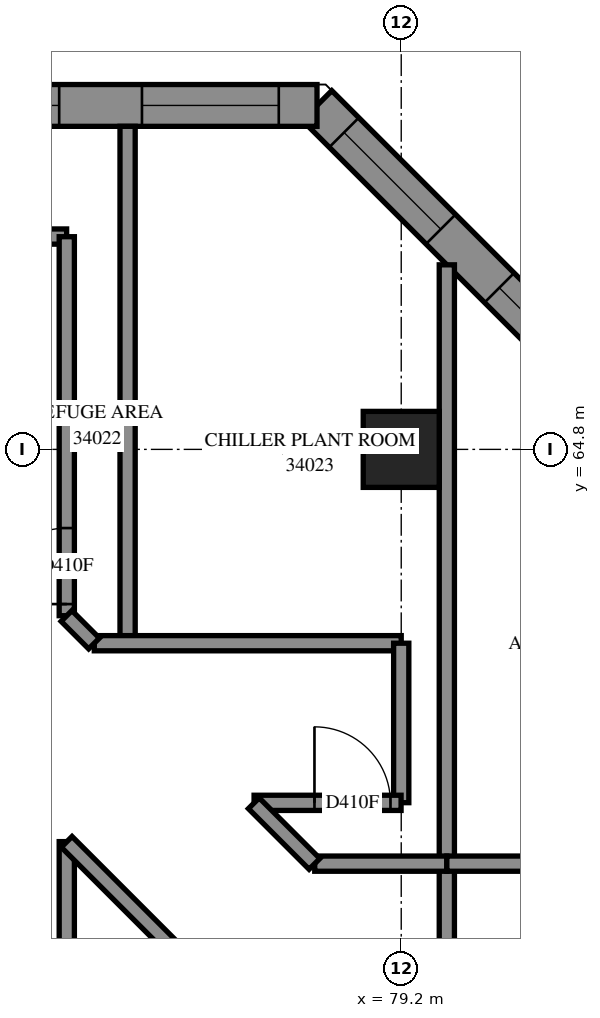
"""IFC4 building model, lengths in metres.
Left out: names, types, materials, properties, quantities, classifications, styles, units other than length and angle.
Written with IfcOpenShell. Run it as: python <this file> out.ifc"""

import sys

from ifc_helpers import new_model, si_unit, direction, frame, frame_2d, origin, origin_2d, place, context, subcontext, project, spatial, polyline, rectangle, outline, extrude, element, fill, save


model = new_model("IFC4")
c1 = context("Model", 3, precision=1e-05, world=origin(), true_north=direction((0.0, 1.0)))
c2 = subcontext(c1, "Body", "Model", "MODEL_VIEW")
j1 = project(units=[si_unit("LENGTHUNIT", "METRE"), si_unit("PLANEANGLEUNIT", "RADIAN")], contexts=[c1])
p1 = place(None, origin())
s1 = spatial("IfcSite", under=j1, at=p1, CompositionType="ELEMENT")
p2 = place(p1, origin())
s2 = spatial("IfcBuilding", under=s1, at=p2, CompositionType="ELEMENT")
p3 = place(p2, frame((0.0, 0.0, 126.2)))
s3 = spatial("IfcBuildingStorey", under=s2, at=p3, CompositionType="ELEMENT", Elevation=126.2)
p4 = place(p3, frame((79.2, 64.8, 0.0), z_axis=(0.0, 0.0, 1.0), x_axis=(1.0, 0.0, 0.0)))
e1 = element("IfcColumn", 1, at=p4, inside=s3, PredefinedType="COLUMN", context=c2, shape_type="SweptSolid", body=[
    extrude(rectangle(XDim=1.0, YDim=1.0, at=origin_2d()), origin(), (0.0, 0.0, 1.0), 4.7),
])
p5 = place(p3, frame((76.407, 49.337, -0.3), z_axis=(0.0, 0.0, 1.0), x_axis=(0.7071067812, 0.7071067812, 0.0)))
e2 = element("IfcWall", 2, at=p5, inside=s3, PredefinedType="SHEAR", context=c2, shape_type="SweptSolid", body=[
    extrude(rectangle(XDim=14.4, YDim=0.7, at=frame_2d((7.2, 0.0))), origin(), (0.0, 0.0, 1.0), 4.3),
])
p6 = place(p5, frame((4.55, 0.0, 0.3)))
e3 = element("IfcOpeningElement", 3, at=p6, cuts=e2, PredefinedType="OPENING", context=c2, shape_type="SweptSolid", body=[
    extrude(rectangle(XDim=1.1, YDim=2.1, at=frame_2d((0.55, 1.05))), frame((0.0, 0.36, 0.0), z_axis=(0.0, -1.0, 0.0), x_axis=(1.0, 0.0, 0.0)), (0.0, 0.0, 1.0), 0.72),
])
p7 = place(p5, frame((11.35, 0.0, 0.3)))
e4 = element("IfcOpeningElement", 4, at=p7, cuts=e2, PredefinedType="OPENING", context=c2, shape_type="SweptSolid", body=[
    extrude(rectangle(XDim=1.1, YDim=2.1, at=frame_2d((0.55, 1.05))), frame((0.0, 0.36, 0.0), z_axis=(0.0, -1.0, 0.0), x_axis=(1.0, 0.0, 0.0)), (0.0, 0.0, 1.0), 0.72),
])
p8 = place(p3, frame((104.267, 43.15, 0.0), z_axis=(0.0, 0.0, 1.0), x_axis=(-0.7071054305, 0.7071081319, 0.0)))
e5 = element("IfcWall", 5, at=p8, inside=s3, PredefinedType="SOLIDWALL", context=c2, shape_type="SweptSolid", body=[
    extrude(outline(polyline([(-0.275, -0.275), (37.131, -0.275), (36.903, 0.275), (0.275, 0.275), (-0.275, -0.275)])), origin(), (0.0, 0.0, 1.0), 4.7),
])
p9 = place(p8, frame((3.325, 0.0, 0.9)))
e6 = element("IfcOpeningElement", 6, at=p9, cuts=e5, PredefinedType="OPENING", context=c2, shape_type="SweptSolid", body=[
    extrude(rectangle(XDim=1.8, YDim=2.4, at=frame_2d((0.9, 1.2))), frame((0.0, 0.285, 0.0), z_axis=(0.0, -1.0, 0.0), x_axis=(1.0, 0.0, 0.0)), (0.0, 0.0, 1.0), 0.57),
])
p10 = place(p8, frame((6.675, 0.0, 0.9)))
e7 = element("IfcOpeningElement", 7, at=p10, cuts=e5, PredefinedType="OPENING", context=c2, shape_type="SweptSolid", body=[
    extrude(rectangle(XDim=1.8, YDim=2.4, at=frame_2d((0.9, 1.2))), frame((0.0, 0.285, 0.0), z_axis=(0.0, -1.0, 0.0), x_axis=(1.0, 0.0, 0.0)), (0.0, 0.0, 1.0), 0.57),
])
p11 = place(p8, frame((24.625, 0.0, 0.9)))
e8 = element("IfcOpeningElement", 8, at=p11, cuts=e5, PredefinedType="OPENING", context=c2, shape_type="SweptSolid", body=[
    extrude(rectangle(XDim=1.8, YDim=2.4, at=frame_2d((0.9, 1.2))), frame((0.0, 0.285, 0.0), z_axis=(0.0, -1.0, 0.0), x_axis=(1.0, 0.0, 0.0)), (0.0, 0.0, 1.0), 0.57),
])
p12 = place(p8, frame((28.225, 0.0, 0.9)))
e9 = element("IfcOpeningElement", 9, at=p12, cuts=e5, PredefinedType="OPENING", context=c2, shape_type="SweptSolid", body=[
    extrude(rectangle(XDim=1.8, YDim=2.4, at=frame_2d((0.9, 1.2))), frame((0.0, 0.285, 0.0), z_axis=(0.0, -1.0, 0.0), x_axis=(1.0, 0.0, 0.0)), (0.0, 0.0, 1.0), 0.57),
])
p13 = place(p8, frame((31.825, 0.0, 0.9)))
e10 = element("IfcOpeningElement", 10, at=p13, cuts=e5, PredefinedType="OPENING", context=c2, shape_type="SweptSolid", body=[
    extrude(rectangle(XDim=1.8, YDim=2.4, at=frame_2d((0.9, 1.2))), frame((0.0, 0.285, 0.0), z_axis=(0.0, -1.0, 0.0), x_axis=(1.0, 0.0, 0.0)), (0.0, 0.0, 1.0), 0.57),
])
p14 = place(p8, frame((34.714, 0.0, 0.9)))
e11 = element("IfcOpeningElement", 11, at=p14, cuts=e5, PredefinedType="OPENING", context=c2, shape_type="SweptSolid", body=[
    extrude(rectangle(XDim=1.8, YDim=2.4, at=frame_2d((0.9, 1.2))), frame((0.0, 0.285, 0.0), z_axis=(0.0, -1.0, 0.0), x_axis=(1.0, 0.0, 0.0)), (0.0, 0.0, 1.0), 0.57),
])
p15 = place(p3, frame((78.092, 69.325, 0.0), z_axis=(0.0, 0.0, 1.0), x_axis=(-1.0, 0.0, 0.0)))
e12 = element("IfcWall", 12, at=p15, inside=s3, PredefinedType="SOLIDWALL", context=c2, shape_type="SweptSolid", body=[
    extrude(outline(polyline([(-0.114, -0.275), (54.092, -0.275), (53.542, 0.275), (0.114, 0.275), (-0.114, -0.275)])), origin(), (0.0, 0.0, 1.0), 4.7),
])
p16 = place(p15, frame((0.503, 0.0, 0.9)))
e13 = element("IfcOpeningElement", 13, at=p16, cuts=e12, PredefinedType="OPENING", context=c2, shape_type="SweptSolid", body=[
    extrude(rectangle(XDim=1.8, YDim=2.4, at=frame_2d((0.9, 1.2))), frame((0.0, 0.285, 0.0), z_axis=(0.0, -1.0, 0.0), x_axis=(1.0, 0.0, 0.0)), (0.0, 0.0, 1.0), 0.57),
])
p17 = place(p15, frame((3.392, 0.0, 0.9)))
e14 = element("IfcOpeningElement", 14, at=p17, cuts=e12, PredefinedType="OPENING", context=c2, shape_type="SweptSolid", body=[
    extrude(rectangle(XDim=1.8, YDim=2.4, at=frame_2d((0.9, 1.2))), frame((0.0, 0.285, 0.0), z_axis=(0.0, -1.0, 0.0), x_axis=(1.0, 0.0, 0.0)), (0.0, 0.0, 1.0), 0.57),
])
p18 = place(p15, frame((6.992, 0.0, 0.9)))
e15 = element("IfcOpeningElement", 15, at=p18, cuts=e12, PredefinedType="OPENING", context=c2, shape_type="SweptSolid", body=[
    extrude(rectangle(XDim=1.8, YDim=2.4, at=frame_2d((0.9, 1.2))), frame((0.0, 0.285, 0.0), z_axis=(0.0, -1.0, 0.0), x_axis=(1.0, 0.0, 0.0)), (0.0, 0.0, 1.0), 0.57),
])
p19 = place(p15, frame((10.592, 0.0, 0.9)))
e16 = element("IfcOpeningElement", 16, at=p19, cuts=e12, PredefinedType="OPENING", context=c2, shape_type="SweptSolid", body=[
    extrude(rectangle(XDim=1.8, YDim=2.4, at=frame_2d((0.9, 1.2))), frame((0.0, 0.285, 0.0), z_axis=(0.0, -1.0, 0.0), x_axis=(1.0, 0.0, 0.0)), (0.0, 0.0, 1.0), 0.57),
])
p20 = place(p15, frame((14.192, 0.0, 0.9)))
e17 = element("IfcOpeningElement", 17, at=p20, cuts=e12, PredefinedType="OPENING", context=c2, shape_type="SweptSolid", body=[
    extrude(rectangle(XDim=1.8, YDim=2.4, at=frame_2d((0.9, 1.2))), frame((0.0, 0.285, 0.0), z_axis=(0.0, -1.0, 0.0), x_axis=(1.0, 0.0, 0.0)), (0.0, 0.0, 1.0), 0.57),
])
p21 = place(p15, frame((17.792, 0.0, 0.9)))
e18 = element("IfcOpeningElement", 18, at=p21, cuts=e12, PredefinedType="OPENING", context=c2, shape_type="SweptSolid", body=[
    extrude(rectangle(XDim=1.8, YDim=2.4, at=frame_2d((0.9, 1.2))), frame((0.0, 0.285, 0.0), z_axis=(0.0, -1.0, 0.0), x_axis=(1.0, 0.0, 0.0)), (0.0, 0.0, 1.0), 0.57),
])
p22 = place(p15, frame((21.392, 0.0, 0.9)))
e19 = element("IfcOpeningElement", 19, at=p22, cuts=e12, PredefinedType="OPENING", context=c2, shape_type="SweptSolid", body=[
    extrude(rectangle(XDim=1.8, YDim=2.4, at=frame_2d((0.9, 1.2))), frame((0.0, 0.285, 0.0), z_axis=(0.0, -1.0, 0.0), x_axis=(1.0, 0.0, 0.0)), (0.0, 0.0, 1.0), 0.57),
])
p23 = place(p15, frame((24.992, 0.0, 0.9)))
e20 = element("IfcOpeningElement", 20, at=p23, cuts=e12, PredefinedType="OPENING", context=c2, shape_type="SweptSolid", body=[
    extrude(rectangle(XDim=1.8, YDim=2.4, at=frame_2d((0.9, 1.2))), frame((0.0, 0.285, 0.0), z_axis=(0.0, -1.0, 0.0), x_axis=(1.0, 0.0, 0.0)), (0.0, 0.0, 1.0), 0.57),
])
p24 = place(p15, frame((28.592, 0.0, 0.9)))
e21 = element("IfcOpeningElement", 21, at=p24, cuts=e12, PredefinedType="OPENING", context=c2, shape_type="SweptSolid", body=[
    extrude(rectangle(XDim=1.8, YDim=2.4, at=frame_2d((0.9, 1.2))), frame((0.0, 0.285, 0.0), z_axis=(0.0, -1.0, 0.0), x_axis=(1.0, 0.0, 0.0)), (0.0, 0.0, 1.0), 0.57),
])
p25 = place(p15, frame((32.192, 0.0, 0.9)))
e22 = element("IfcOpeningElement", 22, at=p25, cuts=e12, PredefinedType="OPENING", context=c2, shape_type="SweptSolid", body=[
    extrude(rectangle(XDim=1.8, YDim=2.4, at=frame_2d((0.9, 1.2))), frame((0.0, 0.285, 0.0), z_axis=(0.0, -1.0, 0.0), x_axis=(1.0, 0.0, 0.0)), (0.0, 0.0, 1.0), 0.57),
])
p26 = place(p15, frame((35.792, 0.0, 0.9)))
e23 = element("IfcOpeningElement", 23, at=p26, cuts=e12, PredefinedType="OPENING", context=c2, shape_type="SweptSolid", body=[
    extrude(rectangle(XDim=1.8, YDim=2.4, at=frame_2d((0.9, 1.2))), frame((0.0, 0.285, 0.0), z_axis=(0.0, -1.0, 0.0), x_axis=(1.0, 0.0, 0.0)), (0.0, 0.0, 1.0), 0.57),
])
p27 = place(p15, frame((39.392, 0.0, 0.9)))
e24 = element("IfcOpeningElement", 24, at=p27, cuts=e12, PredefinedType="OPENING", context=c2, shape_type="SweptSolid", body=[
    extrude(rectangle(XDim=1.8, YDim=2.4, at=frame_2d((0.9, 1.2))), frame((0.0, 0.285, 0.0), z_axis=(0.0, -1.0, 0.0), x_axis=(1.0, 0.0, 0.0)), (0.0, 0.0, 1.0), 0.57),
])
p28 = place(p15, frame((42.992, 0.0, 0.9)))
e25 = element("IfcOpeningElement", 25, at=p28, cuts=e12, PredefinedType="OPENING", context=c2, shape_type="SweptSolid", body=[
    extrude(rectangle(XDim=1.8, YDim=2.4, at=frame_2d((0.9, 1.2))), frame((0.0, 0.285, 0.0), z_axis=(0.0, -1.0, 0.0), x_axis=(1.0, 0.0, 0.0)), (0.0, 0.0, 1.0), 0.57),
])
p29 = place(p15, frame((46.592, 0.0, 0.9)))
e26 = element("IfcOpeningElement", 26, at=p29, cuts=e12, PredefinedType="OPENING", context=c2, shape_type="SweptSolid", body=[
    extrude(rectangle(XDim=1.8, YDim=2.4, at=frame_2d((0.9, 1.2))), frame((0.0, 0.285, 0.0), z_axis=(0.0, -1.0, 0.0), x_axis=(1.0, 0.0, 0.0)), (0.0, 0.0, 1.0), 0.57),
])
p30 = place(p15, frame((50.192, 0.0, 0.9)))
e27 = element("IfcOpeningElement", 27, at=p30, cuts=e12, PredefinedType="OPENING", context=c2, shape_type="SweptSolid", body=[
    extrude(rectangle(XDim=1.8, YDim=2.4, at=frame_2d((0.9, 1.2))), frame((0.0, 0.285, 0.0), z_axis=(0.0, -1.0, 0.0), x_axis=(1.0, 0.0, 0.0)), (0.0, 0.0, 1.0), 0.57),
])
p31 = place(p3, frame((107.838, 44.847, 0.0), z_axis=(0.0, 0.0, 1.0), x_axis=(-0.7071067812, 0.7071067812, 0.0)))
e28 = element("IfcWall", 28, at=p31, inside=s3, PredefinedType="SOLIDWALL", context=c2, shape_type="SweptSolid", body=[
    extrude(outline(polyline([(-0.1, -0.1), (39.926, -0.1), (39.843, 0.1), (0.1, 0.1), (-0.1, -0.1)])), origin(), (0.0, 0.0, 1.0), 4.7),
])
p32 = place(p3, frame((54.8, 67.6, 0.0), z_axis=(0.0, 0.0, 1.0), x_axis=(1.0, 0.0, 0.0)))
e29 = element("IfcWall", 29, at=p32, inside=s3, PredefinedType="PARTITIONING", context=c2, shape_type="SweptSolid", body=[
    extrude(rectangle(XDim=19.998, YDim=0.2, at=frame_2d((9.999, 0.0))), origin(), (0.0, 0.0, 1.0), 4.7),
])
p33 = place(p32, frame((8.738, 0.0, 0.0)))
e30 = element("IfcOpeningElement", 30, at=p33, cuts=e29, PredefinedType="OPENING", context=c2, shape_type="SweptSolid", body=[
    extrude(rectangle(XDim=1.0, YDim=2.1, at=frame_2d((0.5, 1.05))), frame((0.0, 0.11, 0.0), z_axis=(0.0, -1.0, 0.0), x_axis=(1.0, 0.0, 0.0)), (0.0, 0.0, 1.0), 0.22),
])
p34 = place(p3, frame((79.8, 59.35, 0.0), z_axis=(0.0, 0.0, 1.0), x_axis=(0.0, 1.0, 0.0)))
e31 = element("IfcWall", 31, at=p34, inside=s3, PredefinedType="PARTITIONING", context=c2, shape_type="SweptSolid", body=[
    extrude(rectangle(XDim=7.878, YDim=0.2, at=frame_2d((3.939, 0.0))), origin(), (0.0, 0.0, 1.0), 4.7),
])
p35 = place(p3, frame((75.6, 62.25, 0.0), z_axis=(0.0, 0.0, 1.0), x_axis=(0.0, 1.0, 0.0)))
e32 = element("IfcWall", 32, at=p35, inside=s3, PredefinedType="PARTITIONING", context=c2, shape_type="SweptSolid", body=[
    extrude(rectangle(XDim=6.8, YDim=0.2, at=frame_2d((3.4, 0.0))), origin(), (0.0, 0.0, 1.0), 4.7),
])
p36 = place(p3, frame((74.8, 62.612, 0.0), z_axis=(0.0, 0.0, 1.0), x_axis=(0.0, 1.0, 0.0)))
e33 = element("IfcWall", 33, at=p36, inside=s3, PredefinedType="PARTITIONING", context=c2, shape_type="SweptSolid", body=[
    extrude(rectangle(XDim=4.986, YDim=0.2, at=frame_2d((2.493, 0.0))), origin(), (0.0, 0.0, 1.0), 4.7),
])
p37 = place(p36, frame((0.153, 0.0, 0.0)))
e34 = element("IfcOpeningElement", 34, at=p37, cuts=e33, PredefinedType="OPENING", context=c2, shape_type="SweptSolid", body=[
    extrude(rectangle(XDim=1.0, YDim=2.1, at=frame_2d((0.5, 1.05))), frame((0.0, 0.11, 0.0), z_axis=(0.0, -1.0, 0.0), x_axis=(1.0, 0.0, 0.0)), (0.0, 0.0, 1.0), 0.22),
])
p38 = place(p3, frame((74.8, 55.052, 0.0), z_axis=(0.0, 0.0, 1.0), x_axis=(0.0, 1.0, 0.0)))
e35 = element("IfcWall", 35, at=p38, inside=s3, PredefinedType="PARTITIONING", context=c2, shape_type="SweptSolid", body=[
    extrude(rectangle(XDim=4.588, YDim=0.2, at=frame_2d((2.294, 0.0))), origin(), (0.0, 0.0, 1.0), 4.7),
])
p39 = place(p3, frame((75.162, 62.25, 0.0), z_axis=(0.0, 0.0, 1.0), x_axis=(1.0, 0.0, 0.0)))
e36 = element("IfcWall", 36, at=p39, inside=s3, PredefinedType="PARTITIONING", context=c2, shape_type="SweptSolid", body=[
    extrude(rectangle(XDim=4.038, YDim=0.2, at=frame_2d((2.019, 0.0))), origin(), (0.0, 0.0, 1.0), 4.7),
])
p40 = place(p3, frame((74.799, 59.637, 0.0), z_axis=(0.0, 0.0, 1.0), x_axis=(0.7071067812, -0.7071067812, 0.0)))
e37 = element("IfcWall", 37, at=p40, inside=s3, PredefinedType="PARTITIONING", context=c2, shape_type="SweptSolid", body=[
    extrude(rectangle(XDim=3.745, YDim=0.2, at=frame_2d((1.872, 0.0))), origin(), (0.0, 0.0, 1.0), 4.7),
])
p41 = place(p3, frame((79.8, 56.48, 0.0), z_axis=(0.0, 0.0, 1.0), x_axis=(0.0, 1.0, 0.0)))
e38 = element("IfcWall", 38, at=p41, inside=s3, PredefinedType="PARTITIONING", context=c2, shape_type="SweptSolid", body=[
    extrude(rectangle(XDim=2.87, YDim=0.2, at=frame_2d((1.435, 0.0))), origin(), (0.0, 0.0, 1.0), 4.7),
])
p42 = place(p3, frame((79.2, 60.152, 0.0), z_axis=(0.0, 0.0, 1.0), x_axis=(0.0, 1.0, 0.0)))
e39 = element("IfcWall", 39, at=p42, inside=s3, PredefinedType="PARTITIONING", context=c2, shape_type="SweptSolid", body=[
    extrude(rectangle(XDim=2.098, YDim=0.2, at=frame_2d((1.049, 0.0))), origin(), (0.0, 0.0, 1.0), 4.7),
])
p43 = place(p3, frame((77.264, 60.15, 0.0), z_axis=(0.0, 0.0, 1.0), x_axis=(1.0, 0.0, 0.0)))
e40 = element("IfcWall", 40, at=p43, inside=s3, PredefinedType="PARTITIONING", context=c2, shape_type="SweptSolid", body=[
    extrude(rectangle(XDim=1.934, YDim=0.2, at=frame_2d((0.967, 0.0))), origin(), (0.0, 0.0, 1.0), 4.7),
])
p44 = place(p43, frame((0.794, 0.0, 0.0)))
e41 = element("IfcOpeningElement", 41, at=p44, cuts=e40, PredefinedType="OPENING", context=c2, shape_type="SweptSolid", body=[
    extrude(rectangle(XDim=1.0, YDim=2.1, at=frame_2d((0.5, 1.05))), frame((0.0, 0.11, 0.0), z_axis=(0.0, -1.0, 0.0), x_axis=(1.0, 0.0, 0.0)), (0.0, 0.0, 1.0), 0.22),
])
p45 = place(p3, frame((78.062, 59.35, 0.0), z_axis=(0.0, 0.0, 1.0), x_axis=(1.0, 0.0, 0.0)))
e42 = element("IfcWall", 42, at=p45, inside=s3, PredefinedType="PARTITIONING", context=c2, shape_type="SweptSolid", body=[
    extrude(rectangle(XDim=1.738, YDim=0.2, at=frame_2d((0.869, 0.0))), origin(), (0.0, 0.0, 1.0), 4.7),
])
p46 = place(p3, frame((79.8, 59.35, 0.0), z_axis=(0.0, 0.0, 1.0), x_axis=(1.0, 0.0, 0.0)))
e43 = element("IfcWall", 43, at=p46, inside=s3, PredefinedType="PARTITIONING", context=c2, shape_type="SweptSolid", body=[
    extrude(rectangle(XDim=1.148, YDim=0.2, at=frame_2d((0.574, 0.0))), origin(), (0.0, 0.0, 1.0), 4.7),
])
p47 = place(p3, frame((77.26, 60.145, 0.0), z_axis=(0.0, 0.0, 1.0), x_axis=(0.7071067812, -0.7071067812, 0.0)))
e44 = element("IfcWall", 44, at=p47, inside=s3, PredefinedType="PARTITIONING", context=c2, shape_type="SweptSolid", body=[
    extrude(rectangle(XDim=1.129, YDim=0.2, at=frame_2d((0.564, 0.0))), origin(), (0.0, 0.0, 1.0), 4.7),
])
p48 = place(p3, frame((74.796, 62.608, 0.0), z_axis=(0.0, 0.0, 1.0), x_axis=(0.7071067812, -0.7071067812, 0.0)))
e45 = element("IfcWall", 45, at=p48, inside=s3, PredefinedType="PARTITIONING", context=c2, shape_type="SweptSolid", body=[
    extrude(rectangle(XDim=0.512, YDim=0.2, at=frame_2d((0.256, 0.0))), origin(), (0.0, 0.0, 1.0), 4.7),
])
p49 = place(p13, origin())
e46 = element("IfcWindow", 46, at=p49, inside=s3, PartitioningType="SINGLE_PANEL", PredefinedType="WINDOW", context=c2, shape_type="SweptSolid", body=[
    extrude(rectangle(XDim=1.8, YDim=2.4, at=frame_2d((0.9, 1.2))), frame((0.0, 0.155, 0.0), z_axis=(0.0, -1.0, 0.0), x_axis=(1.0, 0.0, 0.0)), (0.0, 0.0, 1.0), 0.06),
])
fill(e10, e46)
p50 = place(p14, origin())
e47 = element("IfcWindow", 47, at=p50, inside=s3, PartitioningType="SINGLE_PANEL", PredefinedType="WINDOW", context=c2, shape_type="SweptSolid", body=[
    extrude(rectangle(XDim=1.8, YDim=2.4, at=frame_2d((0.9, 1.2))), frame((0.0, 0.155, 0.0), z_axis=(0.0, -1.0, 0.0), x_axis=(1.0, 0.0, 0.0)), (0.0, 0.0, 1.0), 0.06),
])
fill(e11, e47)
p51 = place(p16, origin())
e48 = element("IfcWindow", 48, at=p51, inside=s3, PartitioningType="SINGLE_PANEL", PredefinedType="WINDOW", context=c2, shape_type="SweptSolid", body=[
    extrude(rectangle(XDim=1.8, YDim=2.4, at=frame_2d((0.9, 1.2))), frame((0.0, 0.155, 0.0), z_axis=(0.0, -1.0, 0.0), x_axis=(1.0, 0.0, 0.0)), (0.0, 0.0, 1.0), 0.06),
])
fill(e13, e48)
p52 = place(p17, origin())
e49 = element("IfcWindow", 49, at=p52, inside=s3, PartitioningType="SINGLE_PANEL", PredefinedType="WINDOW", context=c2, shape_type="SweptSolid", body=[
    extrude(rectangle(XDim=1.8, YDim=2.4, at=frame_2d((0.9, 1.2))), frame((0.0, 0.155, 0.0), z_axis=(0.0, -1.0, 0.0), x_axis=(1.0, 0.0, 0.0)), (0.0, 0.0, 1.0), 0.06),
])
fill(e14, e49)
p53 = place(p37, origin())
e50 = element("IfcDoor", 50, at=p53, inside=s3, OperationType="SINGLE_SWING_LEFT", PredefinedType="DOOR", context=c2, shape_type="SweptSolid", body=[
    extrude(rectangle(XDim=1.0, YDim=2.1, at=frame_2d((0.5, 1.05))), frame((0.0, 0.025, 0.0), z_axis=(0.0, -1.0, 0.0), x_axis=(1.0, 0.0, 0.0)), (0.0, 0.0, 1.0), 0.05),
])
fill(e34, e50)
p54 = place(p44, origin())
e51 = element("IfcDoor", 51, at=p54, inside=s3, OperationType="SINGLE_SWING_LEFT", PredefinedType="DOOR", context=c2, shape_type="SweptSolid", body=[
    extrude(rectangle(XDim=1.0, YDim=2.1, at=frame_2d((0.5, 1.05))), frame((0.0, 0.025, 0.0), z_axis=(0.0, -1.0, 0.0), x_axis=(1.0, 0.0, 0.0)), (0.0, 0.0, 1.0), 0.05),
])
fill(e41, e51)
save(model, sys.argv[1])
